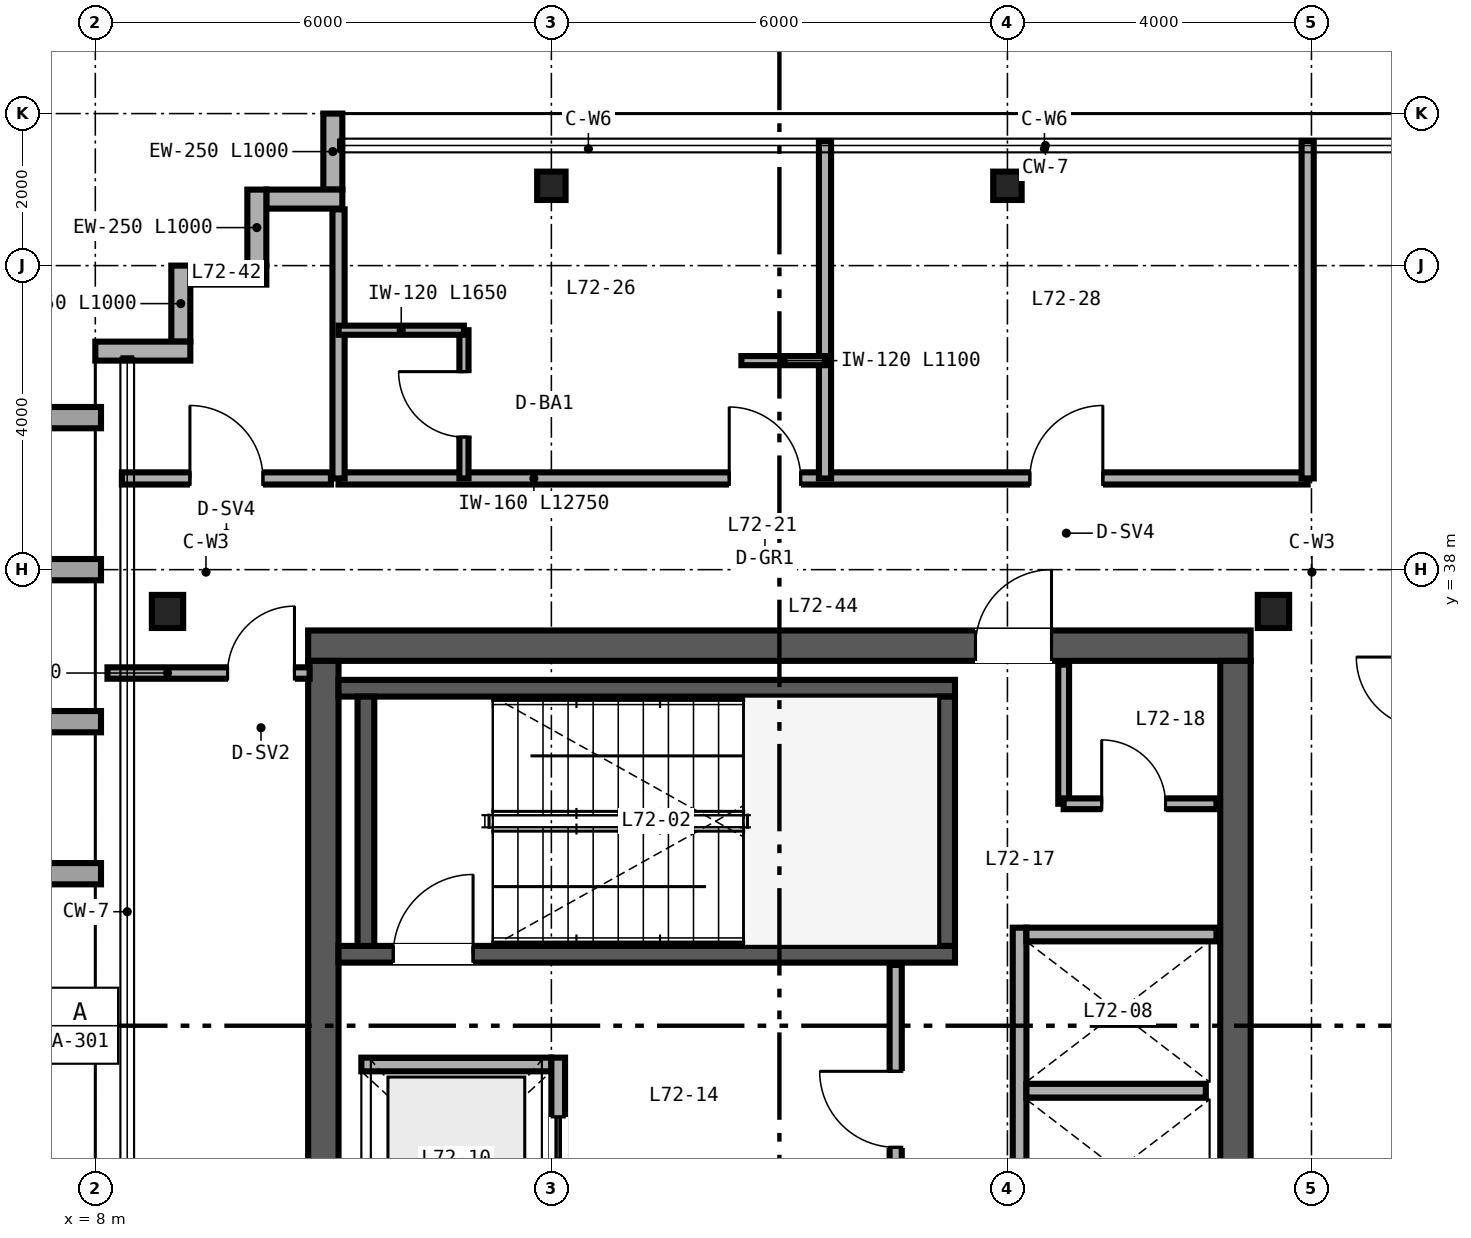
"""IFC4 building model, lengths in metres.
Left out: names, types, materials, properties, quantities, classifications, styles, units other than length and angle.
Written with IfcOpenShell. Run it as: python <this file> out.ifc"""

import sys

from ifc_helpers import new_model, si_unit, direction, frame, frame_2d, origin, origin_2d, place, context, subcontext, project, spatial, rectangle, i_section, extrude, source, transform, mapped, element, fill, save


model = new_model("IFC4")
c1 = context("Model", 3, precision=1e-05, world=origin(), true_north=direction((0.0, 1.0)))
c2 = subcontext(c1, "Body", "Model", "MODEL_VIEW")
j1 = project(units=[si_unit("LENGTHUNIT", "METRE"), si_unit("PLANEANGLEUNIT", "RADIAN")], contexts=[c1])
p1 = place(None, origin())
s1 = spatial("IfcSite", under=j1, at=p1, CompositionType="ELEMENT")
p2 = place(p1, origin())
s2 = spatial("IfcBuilding", under=s1, at=p2, CompositionType="ELEMENT")
p3 = place(p2, frame((0.0, 0.0, 283.2)))
s3 = spatial("IfcBuildingStorey", under=s2, at=p3, CompositionType="ELEMENT", Elevation=283.2)
p4 = place(p3, frame((10.8, 37.0, 0.0), z_axis=(0.0, 0.0, 1.0), x_axis=(1.0, 0.0, 0.0)))
e1 = element("IfcWall", 1, at=p4, inside=s3, PredefinedType="SHEAR", context=c2, shape_type="SweptSolid", body=[
    extrude(rectangle(XDim=12.4, YDim=0.4, at=frame_2d((6.2, 0.0))), origin(), (0.0, 0.0, 1.0), 3.38),
])
p5 = place(p4, frame((8.78, 0.0, 0.0)))
e2 = element("IfcOpeningElement", 2, at=p5, cuts=e1, PredefinedType="OPENING", context=c2, shape_type="SweptSolid", body=[
    extrude(rectangle(XDim=1.0, YDim=2.15, at=frame_2d((0.5, 1.075))), frame((0.0, 0.21, 0.0), z_axis=(0.0, -1.0, 0.0), x_axis=(1.0, 0.0, 0.0)), (0.0, 0.0, 1.0), 0.42),
])
for number, where, z_axis, x_axis in (
    (3, (11.0, 15.2, 0.0), (0.0, 0.0, 1.0), (0.0, 1.0, 0.0)),
    (4, (23.0, 15.2, 0.0), (0.0, 0.0, 1.0), (0.0, 1.0, 0.0)),
):
    element("IfcWall", number, at=place(p3, frame(where, z_axis=z_axis, x_axis=x_axis)), inside=s3, PredefinedType="SHEAR", context=c2, shape_type="SweptSolid", body=[
        extrude(rectangle(XDim=21.6, YDim=0.4, at=frame_2d((10.8, 0.0))), origin(), (0.0, 0.0, 1.0), 3.38),
    ])
p6 = place(p3, frame((11.2, 32.94, 0.0), z_axis=(0.0, 0.0, 1.0), x_axis=(1.0, 0.0, 0.0)))
e5 = element("IfcWall", 5, at=p6, inside=s3, PredefinedType="SHEAR", context=c2, shape_type="SweptSolid", body=[
    extrude(rectangle(XDim=8.11, YDim=0.22, at=frame_2d((4.055, 0.0))), origin(), (0.0, 0.0, 1.0), 3.4),
])
p7 = place(p6, frame((0.72, 0.0, 0.0)))
e6 = element("IfcOpeningElement", 6, at=p7, cuts=e5, PredefinedType="OPENING", context=c2, shape_type="SweptSolid", body=[
    extrude(rectangle(XDim=1.05, YDim=2.15, at=frame_2d((0.525, 1.075))), frame((0.0, 0.12, 0.0), z_axis=(0.0, -1.0, 0.0), x_axis=(1.0, 0.0, 0.0)), (0.0, 0.0, 1.0), 0.24),
])
p8 = place(p3, frame((11.2, 36.44, 0.0), z_axis=(0.0, 0.0, 1.0), x_axis=(1.0, 0.0, 0.0)))
e7 = element("IfcWall", 7, at=p8, inside=s3, PredefinedType="SHEAR", context=c2, shape_type="SweptSolid", body=[
    extrude(rectangle(XDim=8.11, YDim=0.22, at=frame_2d((4.055, 0.0))), origin(), (0.0, 0.0, 1.0), 3.4),
])
for number, where, z_axis, x_axis in (
    (8, (11.56, 33.05, 0.0), (0.0, 0.0, 1.0), (0.0, 1.0, 0.0)),
    (9, (19.2, 33.05, 0.0), (0.0, 0.0, 1.0), (0.0, 1.0, 0.0)),
):
    element("IfcWall", number, at=place(p3, frame(where, z_axis=z_axis, x_axis=x_axis)), inside=s3, PredefinedType="SHEAR", context=c2, shape_type="SweptSolid", body=[
        extrude(rectangle(XDim=3.28, YDim=0.22, at=frame_2d((1.64, 0.0))), origin(), (0.0, 0.0, 1.0), 3.4),
    ])
m1 = source(origin(), c2, "Body", "SweptSolid", [
    extrude(i_section(OverallWidth=0.412, OverallDepth=0.435, WebThickness=0.036, FlangeThickness=0.057, FilletRadius=0.025, at=origin_2d()), origin(), (0.0, 0.0, 1.0), 3.38),
])
for number, where, z_axis, x_axis in (
    (10, (8.95, 37.45, 0.0), (0.0, 0.0, 1.0), (1.0, 0.0, 0.0)),
    (11, (23.5, 37.45, 0.0), (0.0, 0.0, 1.0), (1.0, 0.0, 0.0)),
):
    element("IfcColumn", number, at=place(p3, frame(where, z_axis=z_axis, x_axis=x_axis)), inside=s3, PredefinedType="COLUMN", context=c2, shape_type="MappedRepresentation", body=[
        mapped(m1, transform((0.0, 0.0, 0.0), scale=1.0)),
    ])
m2 = source(origin(), c2, "Body", "SweptSolid", [
    extrude(i_section(OverallWidth=0.374, OverallDepth=0.373, WebThickness=0.016, FlangeThickness=0.026, FilletRadius=0.025, at=origin_2d()), origin(), (0.0, 0.0, 1.0), 3.38),
])
for number, where, z_axis, x_axis in (
    (12, (14.0, 43.05, 0.0), (0.0, 0.0, 1.0), (1.0, 0.0, 0.0)),
    (13, (20.0, 43.05, 0.0), (0.0, 0.0, 1.0), (1.0, 0.0, 0.0)),
):
    element("IfcColumn", number, at=place(p3, frame(where, z_axis=z_axis, x_axis=x_axis)), inside=s3, PredefinedType="COLUMN", context=c2, shape_type="MappedRepresentation", body=[
        mapped(m2, transform((0.0, 0.0, 0.0), scale=1.0)),
    ])
for number, where, z_axis, x_axis in (
    (14, (11.125, 44.0, 0.0), (0.0, 0.0, 1.0), (0.0, -1.0, 0.0)),
    (15, (11.25, 42.875, 0.0), (0.0, 0.0, 1.0), (-1.0, 0.0, 0.0)),
    (16, (10.125, 43.0, 0.0), (0.0, 0.0, 1.0), (0.0, -1.0, 0.0)),
    (17, (10.25, 41.875, 0.0), (0.0, 0.0, 1.0), (-1.0, 0.0, 0.0)),
    (18, (9.125, 42.0, 0.0), (0.0, 0.0, 1.0), (0.0, -1.0, 0.0)),
):
    element("IfcWall", number, at=place(p3, frame(where, z_axis=z_axis, x_axis=x_axis)), inside=s3, PredefinedType="SOLIDWALL", context=c2, shape_type="SweptSolid", body=[
        extrude(rectangle(XDim=1.0, YDim=0.25, at=frame_2d((0.5, 0.0))), origin(), (0.0, 0.0, 1.0), 3.38),
    ])
p9 = place(p3, frame((9.25, 40.875, 0.0), z_axis=(0.0, 0.0, 1.0), x_axis=(-1.0, 0.0, 0.0)))
e19 = element("IfcWall", 19, at=p9, inside=s3, PredefinedType="SOLIDWALL", context=c2, shape_type="SweptSolid", body=[
    extrude(rectangle(XDim=1.25, YDim=0.25, at=frame_2d((0.625, 0.0))), origin(), (0.0, 0.0, 1.0), 3.38),
])
p10 = place(p3, frame((20.16, 29.0, 0.0), z_axis=(0.0, 0.0, 1.0), x_axis=(0.0, 1.0, 0.0)))
e20 = element("IfcWall", 20, at=p10, inside=s3, PredefinedType="SOLIDWALL", context=c2, shape_type="SweptSolid", body=[
    extrude(rectangle(XDim=4.29, YDim=0.18, at=frame_2d((2.145, 0.0))), origin(), (0.0, 0.0, 1.0), 3.38),
])
p11 = place(p3, frame((20.25, 33.2, 0.0), z_axis=(0.0, 0.0, 1.0), x_axis=(1.0, 0.0, 0.0)))
e21 = element("IfcWall", 21, at=p11, inside=s3, PredefinedType="SOLIDWALL", context=c2, shape_type="SweptSolid", body=[
    extrude(rectangle(XDim=2.5, YDim=0.18, at=frame_2d((1.25, 0.0))), origin(), (0.0, 0.0, 1.0), 3.38),
])
p12 = place(p3, frame((20.25, 31.145, 0.0), z_axis=(0.0, 0.0, 1.0), x_axis=(1.0, 0.0, 0.0)))
e22 = element("IfcWall", 22, at=p12, inside=s3, PredefinedType="SOLIDWALL", context=c2, shape_type="SweptSolid", body=[
    extrude(rectangle(XDim=2.36, YDim=0.18, at=frame_2d((1.18, 0.0))), origin(), (0.0, 0.0, 1.0), 3.38),
])
p13 = place(p3, frame((11.5, 31.49, 0.0), z_axis=(0.0, 0.0, 1.0), x_axis=(1.0, 0.0, 0.0)))
e23 = element("IfcWall", 23, at=p13, inside=s3, PredefinedType="SOLIDWALL", context=c2, shape_type="SweptSolid", body=[
    extrude(rectangle(XDim=2.5, YDim=0.18, at=frame_2d((1.25, 0.0))), origin(), (0.0, 0.0, 1.0), 3.38),
])
p14 = place(p3, frame((14.09, 28.92, 0.0), z_axis=(0.0, 0.0, 1.0), x_axis=(0.0, 1.0, 0.0)))
e24 = element("IfcWall", 24, at=p14, inside=s3, PredefinedType="SOLIDWALL", context=c2, shape_type="SweptSolid", body=[
    extrude(rectangle(XDim=2.66, YDim=0.18, at=frame_2d((1.33, 0.0))), origin(), (0.0, 0.0, 1.0), 3.38),
])
p15 = place(p14, frame((0.78, 0.0, 0.0)))
e25 = element("IfcOpeningElement", 25, at=p15, cuts=e24, PredefinedType="OPENING", context=c2, shape_type="SweptSolid", body=[
    extrude(rectangle(XDim=1.1, YDim=2.2, at=frame_2d((0.55, 1.1))), frame((0.0, 0.1, 0.0), z_axis=(0.0, -1.0, 0.0), x_axis=(1.0, 0.0, 0.0)), (0.0, 0.0, 1.0), 0.2),
])
p16 = place(p3, frame((18.53, 28.9, 0.0), z_axis=(0.0, 0.0, 1.0), x_axis=(0.0, 1.0, 0.0)))
e26 = element("IfcWall", 26, at=p16, inside=s3, PredefinedType="PARTITIONING", context=c2, shape_type="SweptSolid", body=[
    extrude(rectangle(XDim=3.9, YDim=0.16, at=frame_2d((1.95, 0.0))), origin(), (0.0, 0.0, 1.0), 3.38),
])
p17 = place(p16, frame((1.5, 0.0, 0.0)))
e27 = element("IfcOpeningElement", 27, at=p17, cuts=e26, PredefinedType="OPENING", context=c2, shape_type="SweptSolid", body=[
    extrude(rectangle(XDim=1.0, YDim=2.15, at=frame_2d((0.5, 1.075))), frame((0.0, 0.09, 0.0), z_axis=(0.0, -1.0, 0.0), x_axis=(1.0, 0.0, 0.0)), (0.0, 0.0, 1.0), 0.18),
])
p18 = place(p3, frame((20.74, 34.92, 0.0), z_axis=(0.0, 0.0, 1.0), x_axis=(0.0, 1.0, 0.0)))
e28 = element("IfcWall", 28, at=p18, inside=s3, PredefinedType="PARTITIONING", context=c2, shape_type="SweptSolid", body=[
    extrude(rectangle(XDim=1.83, YDim=0.142, at=frame_2d((0.915, 0.0))), origin(), (0.0, 0.0, 1.0), 3.38),
])
p19 = place(p3, frame((20.74, 34.92, 0.0), z_axis=(0.0, 0.0, 1.0), x_axis=(1.0, 0.0, 0.0)))
e29 = element("IfcWall", 29, at=p19, inside=s3, PredefinedType="PARTITIONING", context=c2, shape_type="SweptSolid", body=[
    extrude(rectangle(XDim=2.01, YDim=0.142, at=frame_2d((1.005, 0.0))), origin(), (0.0, 0.0, 1.0), 3.38),
])
p20 = place(p19, frame((0.5, 0.0, 0.0)))
e30 = element("IfcOpeningElement", 30, at=p20, cuts=e29, PredefinedType="OPENING", context=c2, shape_type="SweptSolid", body=[
    extrude(rectangle(XDim=0.84, YDim=2.1, at=frame_2d((0.42, 1.05))), frame((0.0, 0.081, 0.0), z_axis=(0.0, -1.0, 0.0), x_axis=(1.0, 0.0, 0.0)), (0.0, 0.0, 1.0), 0.162),
])
p21 = place(p3, frame((11.2, 39.2, 0.0), z_axis=(0.0, 0.0, 1.0), x_axis=(1.0, 0.0, 0.0)))
e31 = element("IfcWall", 31, at=p21, inside=s3, PredefinedType="PARTITIONING", context=c2, shape_type="SweptSolid", body=[
    extrude(rectangle(XDim=12.75, YDim=0.16, at=frame_2d((6.375, 0.0))), origin(), (0.0, 0.0, 1.0), 3.38),
])
p22 = place(p21, frame((5.14, 0.0, 0.0)))
e32 = element("IfcOpeningElement", 32, at=p22, cuts=e31, PredefinedType="OPENING", context=c2, shape_type="SweptSolid", body=[
    extrude(rectangle(XDim=0.94, YDim=2.15, at=frame_2d((0.47, 1.075))), frame((0.0, 0.09, 0.0), z_axis=(0.0, -1.0, 0.0), x_axis=(1.0, 0.0, 0.0)), (0.0, 0.0, 1.0), 0.18),
])
p23 = place(p21, frame((9.095, 0.0, 0.0)))
e33 = element("IfcOpeningElement", 33, at=p23, cuts=e31, PredefinedType="OPENING", context=c2, shape_type="SweptSolid", body=[
    extrude(rectangle(XDim=0.96, YDim=2.15, at=frame_2d((0.48, 1.075))), frame((0.0, 0.09, 0.0), z_axis=(0.0, -1.0, 0.0), x_axis=(1.0, 0.0, 0.0)), (0.0, 0.0, 1.0), 0.18),
])
p24 = place(p3, frame((11.2, 39.2, 0.0), z_axis=(0.0, 0.0, 1.0), x_axis=(0.0, 1.0, 0.0)))
e34 = element("IfcWall", 34, at=p24, inside=s3, PredefinedType="PARTITIONING", context=c2, shape_type="SweptSolid", body=[
    extrude(rectangle(XDim=3.54, YDim=0.16, at=frame_2d((1.77, 0.0))), origin(), (0.0, 0.0, 1.0), 3.38),
])
p25 = place(p3, frame((23.95, 39.2, 0.0), z_axis=(0.0, 0.0, 1.0), x_axis=(0.0, 1.0, 0.0)))
e35 = element("IfcWall", 35, at=p25, inside=s3, PredefinedType="PARTITIONING", context=c2, shape_type="SweptSolid", body=[
    extrude(rectangle(XDim=4.44, YDim=0.16, at=frame_2d((2.22, 0.0))), origin(), (0.0, 0.0, 1.0), 3.38),
])
p26 = place(p3, frame((17.6, 39.2, 0.0), z_axis=(0.0, 0.0, 1.0), x_axis=(0.0, 1.0, 0.0)))
e36 = element("IfcWall", 36, at=p26, inside=s3, PredefinedType="PARTITIONING", context=c2, shape_type="SweptSolid", body=[
    extrude(rectangle(XDim=4.44, YDim=0.16, at=frame_2d((2.22, 0.0))), origin(), (0.0, 0.0, 1.0), 2.687),
])
p27 = place(p3, frame((12.85, 39.2, 0.0), z_axis=(0.0, 0.0, 1.0), x_axis=(0.0, 1.0, 0.0)))
e37 = element("IfcWall", 37, at=p27, inside=s3, PredefinedType="PARTITIONING", context=c2, shape_type="SweptSolid", body=[
    extrude(rectangle(XDim=1.95, YDim=0.12, at=frame_2d((0.975, 0.0))), origin(), (0.0, 0.0, 1.0), 3.38),
])
p28 = place(p27, frame((0.545, 0.0, 0.0)))
e38 = element("IfcOpeningElement", 38, at=p28, cuts=e37, PredefinedType="OPENING", context=c2, shape_type="SweptSolid", body=[
    extrude(rectangle(XDim=0.86, YDim=2.1, at=frame_2d((0.43, 1.05))), frame((0.0, 0.07, 0.0), z_axis=(0.0, -1.0, 0.0), x_axis=(1.0, 0.0, 0.0)), (0.0, 0.0, 1.0), 0.14),
])
p29 = place(p3, frame((11.2, 41.15, 0.0), z_axis=(0.0, 0.0, 1.0), x_axis=(1.0, 0.0, 0.0)))
e39 = element("IfcWall", 39, at=p29, inside=s3, PredefinedType="PARTITIONING", context=c2, shape_type="SweptSolid", body=[
    extrude(rectangle(XDim=1.65, YDim=0.12, at=frame_2d((0.825, 0.0))), origin(), (0.0, 0.0, 1.0), 3.38),
])
p30 = place(p3, frame((16.5, 40.75, 0.0), z_axis=(0.0, 0.0, 1.0), x_axis=(1.0, 0.0, 0.0)))
e40 = element("IfcWall", 40, at=p30, inside=s3, PredefinedType="PARTITIONING", context=c2, shape_type="SweptSolid", body=[
    extrude(rectangle(XDim=1.1, YDim=0.12, at=frame_2d((0.55, 0.0))), origin(), (0.0, 0.0, 1.0), 3.38),
])
p31 = place(p3, frame((8.16, 36.64, 0.0), z_axis=(0.0, 0.0, 1.0), x_axis=(1.0, 0.0, 0.0)))
e41 = element("IfcWall", 41, at=p31, inside=s3, PredefinedType="PARTITIONING", context=c2, shape_type="SweptSolid", body=[
    extrude(rectangle(XDim=2.66, YDim=0.15, at=frame_2d((1.33, 0.0))), origin(), (0.0, 0.0, 1.0), 2.763),
])
p32 = place(p31, frame((1.58, 0.0, 0.0)))
e42 = element("IfcOpeningElement", 42, at=p32, cuts=e41, PredefinedType="OPENING", context=c2, shape_type="SweptSolid", body=[
    extrude(rectangle(XDim=0.88, YDim=2.15, at=frame_2d((0.44, 1.075))), frame((0.0, 0.085, 0.0), z_axis=(0.0, -1.0, 0.0), x_axis=(1.0, 0.0, 0.0)), (0.0, 0.0, 1.0), 0.17),
])
p33 = place(p3, frame((8.35, 39.2, 0.0), z_axis=(0.0, 0.0, 1.0), x_axis=(1.0, 0.0, 0.0)))
e43 = element("IfcWall", 43, at=p33, inside=s3, PredefinedType="PARTITIONING", context=c2, shape_type="SweptSolid", body=[
    extrude(rectangle(XDim=2.75, YDim=0.16, at=frame_2d((1.375, 0.0))), origin(), (0.0, 0.0, 1.0), 3.38),
])
p34 = place(p33, frame((0.895, 0.0, 0.0)))
e44 = element("IfcOpeningElement", 44, at=p34, cuts=e43, PredefinedType="OPENING", context=c2, shape_type="SweptSolid", body=[
    extrude(rectangle(XDim=0.96, YDim=2.15, at=frame_2d((0.48, 1.075))), frame((0.0, 0.09, 0.0), z_axis=(0.0, -1.0, 0.0), x_axis=(1.0, 0.0, 0.0)), (0.0, 0.0, 1.0), 0.18),
])
m3 = source(origin(), c2, "Body", "SweptSolid", [
    extrude(rectangle(XDim=1.05, YDim=2.15, at=frame_2d((0.525, 1.075))), frame((0.0, 0.025, 0.0), z_axis=(0.0, -1.0, 0.0), x_axis=(1.0, 0.0, 0.0)), (0.0, 0.0, 1.0), 0.05),
])
p35 = place(p7, origin())
e45 = element("IfcDoor", 45, at=p35, inside=s3, OperationType="SINGLE_SWING_RIGHT", PredefinedType="DOOR", context=c2, shape_type="MappedRepresentation", body=[
    mapped(m3, transform((0.0, 0.0, 0.0), scale=1.0)),
])
fill(e6, e45)
m4 = source(origin(), c2, "Body", "SweptSolid", [
    extrude(rectangle(XDim=1.1, YDim=2.2, at=frame_2d((0.55, 1.1))), frame((0.0, 0.025, 0.0), z_axis=(0.0, -1.0, 0.0), x_axis=(1.0, 0.0, 0.0)), (0.0, 0.0, 1.0), 0.05),
])
p36 = place(p15, origin())
e46 = element("IfcDoor", 46, at=p36, inside=s3, OperationType="DOUBLE_DOOR_SLIDING", PredefinedType="DOOR", context=c2, shape_type="MappedRepresentation", body=[
    mapped(m4, transform((0.0, 0.0, 0.0), scale=1.0)),
])
fill(e25, e46)
m5 = source(origin(), c2, "Body", "SweptSolid", [
    extrude(rectangle(XDim=1.0, YDim=2.15, at=frame_2d((0.5, 1.075))), frame((0.0, 0.025, 0.0), z_axis=(0.0, -1.0, 0.0), x_axis=(1.0, 0.0, 0.0)), (0.0, 0.0, 1.0), 0.05),
])
p37 = place(p17, origin())
e47 = element("IfcDoor", 47, at=p37, inside=s3, OperationType="SINGLE_SWING_RIGHT", PredefinedType="DOOR", context=c2, shape_type="MappedRepresentation", body=[
    mapped(m5, transform((0.0, 0.0, 0.0), scale=1.0)),
])
fill(e27, e47)
m6 = source(origin(), c2, "Body", "SweptSolid", [
    extrude(rectangle(XDim=0.84, YDim=2.1, at=frame_2d((0.42, 1.05))), frame((0.0, 0.025, 0.0), z_axis=(0.0, -1.0, 0.0), x_axis=(1.0, 0.0, 0.0)), (0.0, 0.0, 1.0), 0.05),
])
p38 = place(p20, origin())
e48 = element("IfcDoor", 48, at=p38, inside=s3, OperationType="SINGLE_SWING_LEFT", PredefinedType="DOOR", context=c2, shape_type="MappedRepresentation", body=[
    mapped(m6, transform((0.0, 0.0, 0.0), scale=1.0)),
])
fill(e30, e48)
p39 = place(p5, origin())
e49 = element("IfcDoor", 49, at=p39, inside=s3, OperationType="SINGLE_SWING_RIGHT", PredefinedType="DOOR", context=c2, shape_type="MappedRepresentation", body=[
    mapped(m5, transform((0.0, 0.0, 0.0), scale=1.0)),
])
fill(e2, e49)
m7 = source(origin(), c2, "Body", "SweptSolid", [
    extrude(rectangle(XDim=0.86, YDim=2.1, at=frame_2d((0.43, 1.05))), frame((0.0, 0.025, 0.0), z_axis=(0.0, -1.0, 0.0), x_axis=(1.0, 0.0, 0.0)), (0.0, 0.0, 1.0), 0.05),
])
p40 = place(p28, origin())
e50 = element("IfcDoor", 50, at=p40, inside=s3, OperationType="SINGLE_SWING_RIGHT", PredefinedType="DOOR", context=c2, shape_type="MappedRepresentation", body=[
    mapped(m7, transform((0.0, 0.0, 0.0), scale=1.0)),
])
fill(e38, e50)
m8 = source(origin(), c2, "Body", "SweptSolid", [
    extrude(rectangle(XDim=0.94, YDim=2.15, at=frame_2d((0.47, 1.075))), frame((0.0, 0.025, 0.0), z_axis=(0.0, -1.0, 0.0), x_axis=(1.0, 0.0, 0.0)), (0.0, 0.0, 1.0), 0.05),
])
p41 = place(p22, origin())
e51 = element("IfcDoor", 51, at=p41, inside=s3, OperationType="SINGLE_SWING_LEFT", PredefinedType="DOOR", context=c2, shape_type="MappedRepresentation", body=[
    mapped(m8, transform((0.0, 0.0, 0.0), scale=1.0)),
])
fill(e32, e51)
m9 = source(origin(), c2, "Body", "SweptSolid", [
    extrude(rectangle(XDim=0.96, YDim=2.15, at=frame_2d((0.48, 1.075))), frame((0.0, 0.025, 0.0), z_axis=(0.0, -1.0, 0.0), x_axis=(1.0, 0.0, 0.0)), (0.0, 0.0, 1.0), 0.05),
])
p42 = place(p23, origin())
e52 = element("IfcDoor", 52, at=p42, inside=s3, OperationType="SINGLE_SWING_RIGHT", PredefinedType="DOOR", context=c2, shape_type="MappedRepresentation", body=[
    mapped(m9, transform((0.0, 0.0, 0.0), scale=1.0)),
])
fill(e33, e52)
m10 = source(origin(), c2, "Body", "SweptSolid", [
    extrude(rectangle(XDim=0.88, YDim=2.15, at=frame_2d((0.44, 1.075))), frame((0.0, 0.025, 0.0), z_axis=(0.0, -1.0, 0.0), x_axis=(1.0, 0.0, 0.0)), (0.0, 0.0, 1.0), 0.05),
])
p43 = place(p32, origin())
e53 = element("IfcDoor", 53, at=p43, inside=s3, OperationType="SINGLE_SWING_RIGHT", PredefinedType="DOOR", context=c2, shape_type="MappedRepresentation", body=[
    mapped(m10, transform((0.0, 0.0, 0.0), scale=1.0)),
])
fill(e42, e53)
p44 = place(p34, origin())
e54 = element("IfcDoor", 54, at=p44, inside=s3, OperationType="SINGLE_SWING_LEFT", PredefinedType="DOOR", context=c2, shape_type="MappedRepresentation", body=[
    mapped(m9, transform((0.0, 0.0, 0.0), scale=1.0)),
])
fill(e44, e54)
save(model, sys.argv[1])
